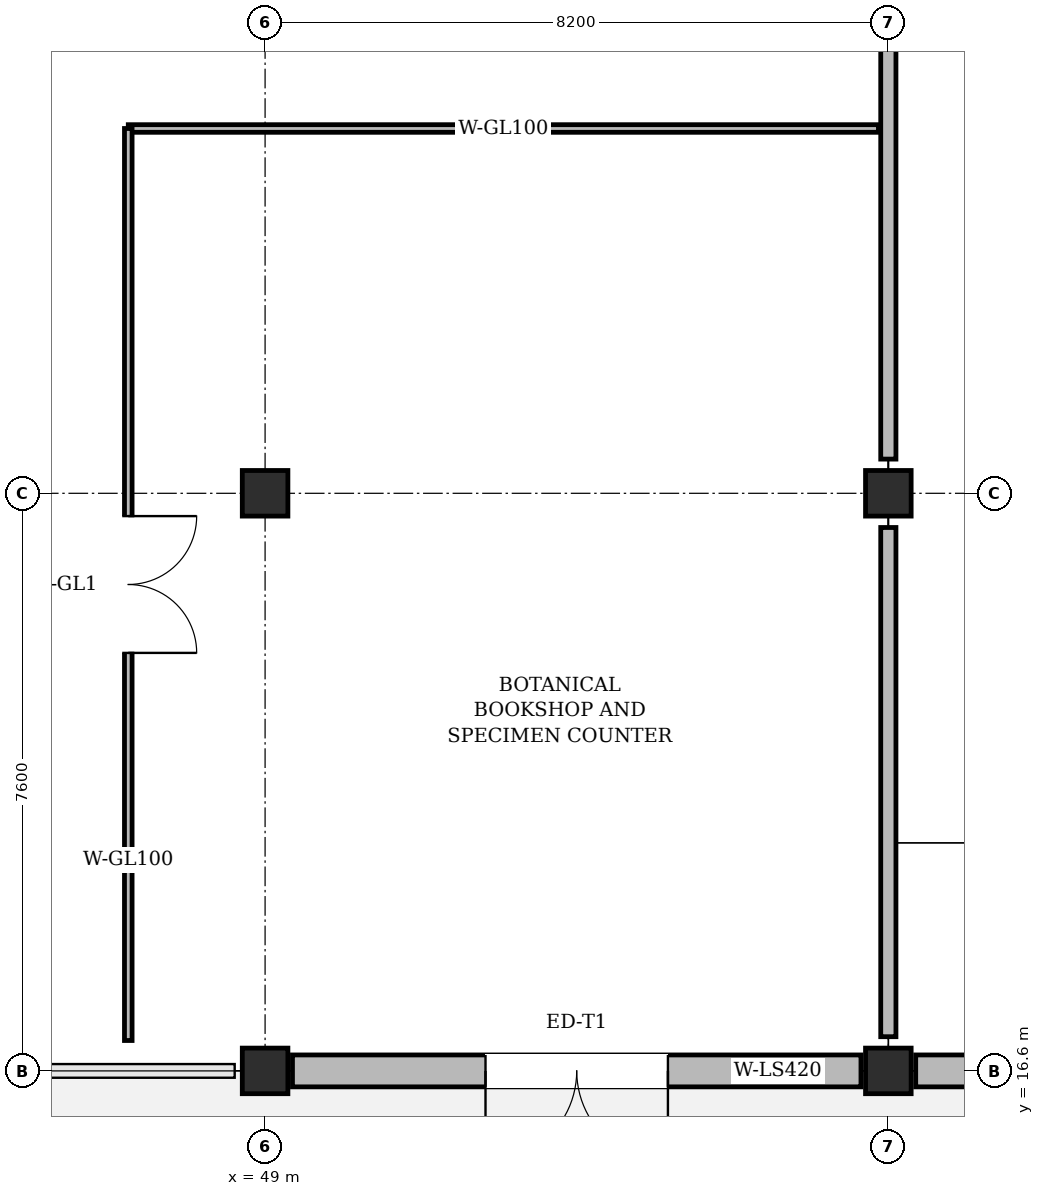
"""IFC4 building model, lengths in metres.
Left out: names, types, materials, properties, quantities, classifications, styles, units other than length and angle.
Written with IfcOpenShell. Run it as: python <this file> out.ifc"""

import sys

from ifc_helpers import new_model, si_unit, direction, frame, frame_2d, origin, origin_2d, place, context, subcontext, project, spatial, rectangle, extrude, element, fill, save


model = new_model("IFC4")
c1 = context("Model", 3, precision=1e-05, world=origin(), true_north=direction((0.0, 1.0)))
c2 = subcontext(c1, "Body", "Model", "MODEL_VIEW")
j1 = project(units=[si_unit("LENGTHUNIT", "METRE"), si_unit("PLANEANGLEUNIT", "RADIAN")], contexts=[c1])
p1 = place(None, origin())
s1 = spatial("IfcSite", under=j1, at=p1, CompositionType="ELEMENT")
p2 = place(p1, origin())
s2 = spatial("IfcBuilding", under=s1, at=p2, CompositionType="ELEMENT")
p3 = place(p2, origin())
s3 = spatial("IfcBuildingStorey", under=s2, at=p3, CompositionType="ELEMENT", Elevation=0.0)
for number, where, z_axis, x_axis in (
    (1, (49.0, 16.6, 0.0), (0.0, 0.0, 1.0), (1.0, 0.0, 0.0)),
    (2, (49.0, 24.2, 0.0), (0.0, 0.0, 1.0), (1.0, 0.0, 0.0)),
    (3, (57.2, 16.6, 0.0), (0.0, 0.0, 1.0), (1.0, 0.0, 0.0)),
    (4, (57.2, 24.2, 0.0), (0.0, 0.0, 1.0), (1.0, 0.0, 0.0)),
):
    element("IfcColumn", number, at=place(p3, frame(where, z_axis=z_axis, x_axis=x_axis)), inside=s3, PredefinedType="COLUMN", context=c2, shape_type="SweptSolid", body=[
        extrude(rectangle(XDim=0.6, YDim=0.6, at=origin_2d()), origin(), (0.0, 0.0, 1.0), 5.1),
    ])
p4 = place(p3, frame((57.56, 16.6, 0.0), z_axis=(0.0, 0.0, 1.0), x_axis=(1.0, 0.0, 0.0)))
e5 = element("IfcWall", 5, at=p4, inside=s3, PredefinedType="SOLIDWALL", context=c2, shape_type="SweptSolid", body=[
    extrude(rectangle(XDim=7.48, YDim=0.42, at=frame_2d((3.74, 0.0))), origin(), (0.0, 0.0, 1.0), 4.335),
])
p5 = place(p4, frame((2.54, 0.0, 0.0)))
e6 = element("IfcOpeningElement", 6, at=p5, cuts=e5, PredefinedType="OPENING", context=c2, shape_type="SweptSolid", body=[
    extrude(rectangle(XDim=2.4, YDim=2.6, at=frame_2d((1.2, 1.3))), frame((0.0, 0.222, 0.0), z_axis=(0.0, -1.0, 0.0), x_axis=(1.0, 0.0, 0.0)), (0.0, 0.0, 1.0), 0.444),
])
p6 = place(p3, frame((49.36, 16.6, 0.0), z_axis=(0.0, 0.0, 1.0), x_axis=(1.0, 0.0, 0.0)))
e7 = element("IfcWall", 7, at=p6, inside=s3, PredefinedType="SOLIDWALL", context=c2, shape_type="SweptSolid", body=[
    extrude(rectangle(XDim=7.48, YDim=0.42, at=frame_2d((3.74, 0.0))), origin(), (0.0, 0.0, 1.0), 4.335),
])
p7 = place(p6, frame((2.54, 0.0, 0.0)))
e8 = element("IfcOpeningElement", 8, at=p7, cuts=e7, PredefinedType="OPENING", context=c2, shape_type="SweptSolid", body=[
    extrude(rectangle(XDim=2.4, YDim=2.6, at=frame_2d((1.2, 1.3))), frame((0.0, 0.222, 0.0), z_axis=(0.0, -1.0, 0.0), x_axis=(1.0, 0.0, 0.0)), (0.0, 0.0, 1.0), 0.444),
])
p8 = place(p3, frame((57.2, 17.05, 0.0), z_axis=(0.0, 0.0, 1.0), x_axis=(0.0, 1.0, 0.0)))
e9 = element("IfcWall", 9, at=p8, inside=s3, PredefinedType="PARTITIONING", context=c2, shape_type="SweptSolid", body=[
    extrude(rectangle(XDim=6.7, YDim=0.2, at=frame_2d((3.35, 0.0))), origin(), (0.0, 0.0, 1.0), 4.335),
])
p9 = place(p3, frame((57.2, 24.65, 0.0), z_axis=(0.0, 0.0, 1.0), x_axis=(0.0, 1.0, 0.0)))
e10 = element("IfcWall", 10, at=p9, inside=s3, PredefinedType="PARTITIONING", context=c2, shape_type="SweptSolid", body=[
    extrude(rectangle(XDim=6.7, YDim=0.2, at=frame_2d((3.35, 0.0))), origin(), (0.0, 0.0, 1.0), 4.335),
])
p10 = place(p3, frame((57.07, 29.0, 0.0), z_axis=(0.0, 0.0, 1.0), x_axis=(-1.0, 0.0, 0.0)))
e11 = element("IfcWall", 11, at=p10, inside=s3, PredefinedType="PARTITIONING", context=c2, shape_type="SweptSolid", body=[
    extrude(rectangle(XDim=9.87, YDim=0.1, at=frame_2d((4.935, 0.0))), origin(), (0.0, 0.0, 1.0), 5.005),
])
p11 = place(p3, frame((47.2, 29.0, 0.0), z_axis=(0.0, 0.0, 1.0), x_axis=(0.0, -1.0, 0.0)))
e12 = element("IfcWall", 12, at=p11, inside=s3, PredefinedType="PARTITIONING", context=c2, shape_type="SweptSolid", body=[
    extrude(rectangle(XDim=12.0, YDim=0.1, at=frame_2d((6.0, 0.0))), origin(), (0.0, 0.0, 1.0), 5.005),
])
p12 = place(p11, frame((5.1, 0.0, 0.0)))
e13 = element("IfcOpeningElement", 13, at=p12, cuts=e12, PredefinedType="OPENING", context=c2, shape_type="SweptSolid", body=[
    extrude(rectangle(XDim=1.8, YDim=2.4, at=frame_2d((0.9, 1.2))), frame((0.0, 0.062, 0.0), z_axis=(0.0, -1.0, 0.0), x_axis=(1.0, 0.0, 0.0)), (0.0, 0.0, 1.0), 0.124),
])
p13 = place(p7, frame((2.4, 0.0, 0.0), z_axis=(0.0, 0.0, 1.0), x_axis=(-1.0, 0.0, 0.0)))
e14 = element("IfcDoor", 14, at=p13, inside=s3, OperationType="DOUBLE_DOOR_SINGLE_SWING", PredefinedType="DOOR", context=c2, shape_type="SweptSolid", body=[
    extrude(rectangle(XDim=2.4, YDim=2.6, at=frame_2d((1.2, 1.3))), frame((0.0, 0.025, 0.0), z_axis=(0.0, -1.0, 0.0), x_axis=(1.0, 0.0, 0.0)), (0.0, 0.0, 1.0), 0.05),
])
fill(e8, e14)
p14 = place(p12, origin())
e15 = element("IfcDoor", 15, at=p14, inside=s3, OperationType="DOUBLE_DOOR_SINGLE_SWING", PredefinedType="DOOR", context=c2, shape_type="SweptSolid", body=[
    extrude(rectangle(XDim=1.8, YDim=2.4, at=frame_2d((0.9, 1.2))), frame((0.0, 0.025, 0.0), z_axis=(0.0, -1.0, 0.0), x_axis=(1.0, 0.0, 0.0)), (0.0, 0.0, 1.0), 0.05),
])
fill(e13, e15)
save(model, sys.argv[1])
